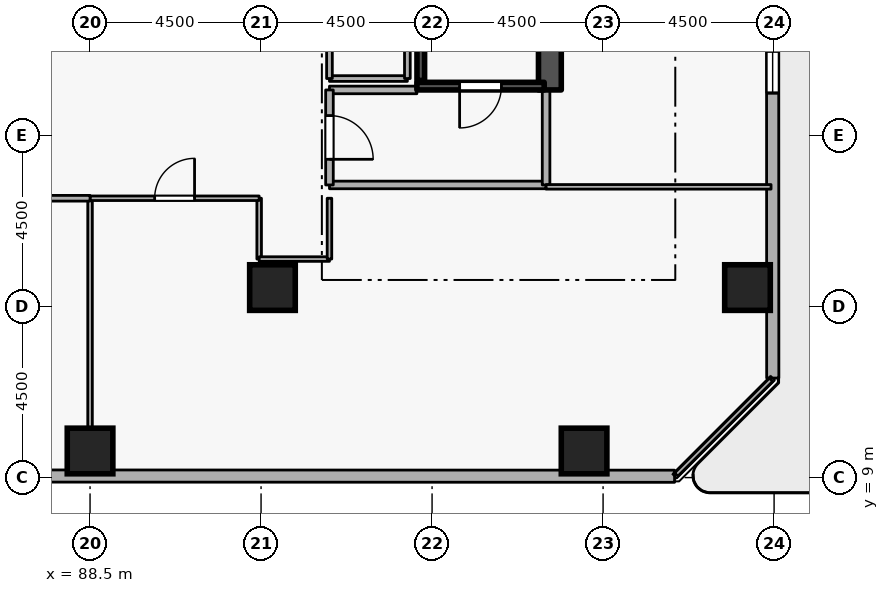
"""IFC4 building model, lengths in metres.
Left out: names, types, materials, properties, quantities, classifications, styles, units other than length and angle.
Written with IfcOpenShell. Run it as: python <this file> out.ifc"""

import sys

from ifc_helpers import new_model, si_unit, direction, frame, frame_2d, origin, origin_2d, place, context, subcontext, project, spatial, rectangle, extrude, element, fill, save


model = new_model("IFC4")
c1 = context("Model", 3, precision=1e-05, world=origin(), true_north=direction((0.0, 1.0)))
c2 = subcontext(c1, "Body", "Model", "MODEL_VIEW")
j1 = project(units=[si_unit("LENGTHUNIT", "METRE"), si_unit("PLANEANGLEUNIT", "RADIAN")], contexts=[c1])
p1 = place(None, origin())
s1 = spatial("IfcSite", under=j1, at=p1, CompositionType="ELEMENT")
p2 = place(p1, origin())
s2 = spatial("IfcBuilding", under=s1, at=p2, CompositionType="ELEMENT")
p3 = place(p2, frame((0.0, 0.0, 75.9)))
s3 = spatial("IfcBuildingStorey", under=s2, at=p3, CompositionType="ELEMENT", Elevation=75.9)
p4 = place(p3, frame((100.6, 19.2, 0.0), z_axis=(0.0, 0.0, 1.0), x_axis=(0.0, 1.0, 0.0)))
e1 = element("IfcWall", 1, at=p4, inside=s3, PredefinedType="SHEAR", context=c2, shape_type="SweptSolid", body=[
    extrude(rectangle(XDim=15.6, YDim=0.6, at=frame_2d((7.8, 0.0))), origin(), (0.0, 0.0, 1.0), 4.2),
])
for number, where, z_axis, x_axis in (
    (2, (105.8, 14.0, 0.0), (0.0, 0.0, 1.0), (1.0, 0.0, 0.0)),
    (3, (101.5, 9.7, 0.0), (0.0, 0.0, 1.0), (1.0, 0.0, 0.0)),
    (4, (88.5, 9.7, 0.0), (0.0, 0.0, 1.0), (1.0, 0.0, 0.0)),
    (5, (93.3, 14.0, 0.0), (0.0, 0.0, 1.0), (1.0, 0.0, 0.0)),
):
    element("IfcColumn", number, at=place(p3, frame(where, z_axis=z_axis, x_axis=x_axis)), inside=s3, PredefinedType="COLUMN", context=c2, shape_type="SweptSolid", body=[
        extrude(rectangle(XDim=1.2, YDim=1.2, at=origin_2d()), origin(), (0.0, 0.0, 1.0), 4.2),
    ])
p5 = place(p3, frame((70.704, 9.047, 0.0), z_axis=(0.0, 0.0, 1.0), x_axis=(0.99999993762, -0.000353213856, 0.0)))
e6 = element("IfcWall", 6, at=p5, inside=s3, PredefinedType="STANDARD", context=c2, shape_type="SweptSolid", body=[
    extrude(rectangle(XDim=33.177, YDim=0.32, at=frame_2d((16.589, 0.0))), origin(), (0.0, 0.0, 1.0), 3.3),
])
p6 = place(p3, frame((106.465, 11.619, 0.0), z_axis=(0.0, 0.0, 1.0), x_axis=(-0.000353213856, 0.99999993762, 0.0)))
e7 = element("IfcWall", 7, at=p6, inside=s3, PredefinedType="STANDARD", context=c2, shape_type="SweptSolid", body=[
    extrude(rectangle(XDim=33.177, YDim=0.32, at=frame_2d((16.589, 0.0))), origin(), (0.0, 0.0, 1.0), 3.3),
])
p7 = place(p6, frame((30.014, 0.0, 0.0)))
e8 = element("IfcOpeningElement", 8, at=p7, cuts=e7, PredefinedType="OPENING", context=c2, shape_type="SweptSolid", body=[
    extrude(rectangle(XDim=1.15, YDim=2.1, at=frame_2d((0.575, 1.05))), frame((0.0, 0.17, 0.0), z_axis=(0.0, -1.0, 0.0), x_axis=(1.0, 0.0, 0.0)), (0.0, 0.0, 1.0), 0.34),
])
p8 = place(p6, frame((7.5, 0.0, 0.72)))
e9 = element("IfcOpeningElement", 9, at=p8, cuts=e7, PredefinedType="OPENING", context=c2, shape_type="SweptSolid", body=[
    extrude(rectangle(XDim=1.1, YDim=1.8, at=frame_2d((0.55, 0.9))), frame((0.0, 0.17, 0.0), z_axis=(0.0, -1.0, 0.0), x_axis=(1.0, 0.0, 0.0)), (0.0, 0.0, 1.0), 0.34),
])
p9 = place(p6, frame((12.3, 0.0, 0.72)))
e10 = element("IfcOpeningElement", 10, at=p9, cuts=e7, PredefinedType="OPENING", context=c2, shape_type="SweptSolid", body=[
    extrude(rectangle(XDim=1.1, YDim=1.8, at=frame_2d((0.55, 0.9))), frame((0.0, 0.17, 0.0), z_axis=(0.0, -1.0, 0.0), x_axis=(1.0, 0.0, 0.0)), (0.0, 0.0, 1.0), 0.34),
])
p10 = place(p6, frame((17.1, 0.0, 0.72)))
e11 = element("IfcOpeningElement", 11, at=p10, cuts=e7, PredefinedType="OPENING", context=c2, shape_type="SweptSolid", body=[
    extrude(rectangle(XDim=1.1, YDim=1.8, at=frame_2d((0.55, 0.9))), frame((0.0, 0.17, 0.0), z_axis=(0.0, -1.0, 0.0), x_axis=(1.0, 0.0, 0.0)), (0.0, 0.0, 1.0), 0.34),
])
p11 = place(p6, frame((21.9, 0.0, 0.72)))
e12 = element("IfcOpeningElement", 12, at=p11, cuts=e7, PredefinedType="OPENING", context=c2, shape_type="SweptSolid", body=[
    extrude(rectangle(XDim=1.1, YDim=1.8, at=frame_2d((0.55, 0.9))), frame((0.0, 0.17, 0.0), z_axis=(0.0, -1.0, 0.0), x_axis=(1.0, 0.0, 0.0)), (0.0, 0.0, 1.0), 0.34),
])
p12 = place(p3, frame((100.45, 19.3, 0.0), z_axis=(0.0, 0.0, 1.0), x_axis=(-1.0, 0.0, 0.0)))
e13 = element("IfcWall", 13, at=p12, inside=s3, PredefinedType="SHEAR", context=c2, shape_type="SweptSolid", body=[
    extrude(rectangle(XDim=3.35, YDim=0.2, at=frame_2d((1.675, 0.0))), origin(), (0.0, 0.0, 1.0), 4.2),
])
p13 = place(p12, frame((1.125, 0.0, 0.0)))
e14 = element("IfcOpeningElement", 14, at=p13, cuts=e13, PredefinedType="OPENING", context=c2, shape_type="SweptSolid", body=[
    extrude(rectangle(XDim=1.1, YDim=2.1, at=frame_2d((0.55, 1.05))), frame((0.0, 0.11, 0.0), z_axis=(0.0, -1.0, 0.0), x_axis=(1.0, 0.0, 0.0)), (0.0, 0.0, 1.0), 0.22),
])
p14 = place(p3, frame((97.203, 26.55, 0.0), z_axis=(0.0, 0.0, 1.0), x_axis=(0.0, -1.0, 0.0)))
e15 = element("IfcWall", 15, at=p14, inside=s3, PredefinedType="SHEAR", context=c2, shape_type="SweptSolid", body=[
    extrude(rectangle(XDim=7.1, YDim=0.2, at=frame_2d((3.55, 0.0))), origin(), (0.0, 0.0, 1.0), 4.2),
])
p15 = place(p3, frame((94.8, 16.7, 0.0), z_axis=(0.0, 0.0, 1.0), x_axis=(1.0, 0.0, 0.0)))
e16 = element("IfcWall", 16, at=p15, inside=s3, PredefinedType="STANDARD", context=c2, shape_type="SweptSolid", body=[
    extrude(rectangle(XDim=5.7, YDim=0.2, at=frame_2d((2.85, 0.0))), origin(), (0.0, 0.0, 1.0), 3.94),
])
p16 = place(p3, frame((100.5, 16.7, 0.0), z_axis=(0.0, 0.0, 1.0), x_axis=(0.0, 1.0, 0.0)))
e17 = element("IfcWall", 17, at=p16, inside=s3, PredefinedType="STANDARD", context=c2, shape_type="SweptSolid", body=[
    extrude(rectangle(XDim=2.5, YDim=0.2, at=frame_2d((1.25, 0.0))), origin(), (0.0, 0.0, 1.0), 3.94),
])
p17 = place(p3, frame((97.1, 19.2, 0.0), z_axis=(0.0, 0.0, 1.0), x_axis=(-1.0, 0.0, 0.0)))
e18 = element("IfcWall", 18, at=p17, inside=s3, PredefinedType="STANDARD", context=c2, shape_type="SweptSolid", body=[
    extrude(rectangle(XDim=2.3, YDim=0.2, at=frame_2d((1.15, 0.0))), origin(), (0.0, 0.0, 1.0), 3.145),
])
p18 = place(p3, frame((94.8, 19.2, 0.0), z_axis=(0.0, 0.0, 1.0), x_axis=(0.0, -1.0, 0.0)))
e19 = element("IfcWall", 19, at=p18, inside=s3, PredefinedType="STANDARD", context=c2, shape_type="SweptSolid", body=[
    extrude(rectangle(XDim=2.5, YDim=0.2, at=frame_2d((1.25, 0.0))), origin(), (0.0, 0.0, 1.0), 3.94),
])
p19 = place(p18, frame((0.675, 0.0, 0.0)))
e20 = element("IfcOpeningElement", 20, at=p19, cuts=e19, PredefinedType="OPENING", context=c2, shape_type="SweptSolid", body=[
    extrude(rectangle(XDim=1.15, YDim=2.1, at=frame_2d((0.575, 1.05))), frame((0.0, 0.11, 0.0), z_axis=(0.0, -1.0, 0.0), x_axis=(1.0, 0.0, 0.0)), (0.0, 0.0, 1.0), 0.22),
])
p20 = place(p3, frame((94.8, 19.5, 0.0), z_axis=(0.0, 0.0, 1.0), x_axis=(1.0, 0.0, 0.0)))
e21 = element("IfcWall", 21, at=p20, inside=s3, PredefinedType="PARTITIONING", context=c2, shape_type="SweptSolid", body=[
    extrude(rectangle(XDim=2.05, YDim=0.15, at=frame_2d((1.025, 0.0))), origin(), (0.0, 0.0, 1.0), 3.145),
])
p21 = place(p3, frame((96.85, 19.5, 0.0), z_axis=(0.0, 0.0, 1.0), x_axis=(0.0, 1.0, 0.0)))
e22 = element("IfcWall", 22, at=p21, inside=s3, PredefinedType="PARTITIONING", context=c2, shape_type="SweptSolid", body=[
    extrude(rectangle(XDim=2.6, YDim=0.15, at=frame_2d((1.3, 0.0))), origin(), (0.0, 0.0, 1.0), 3.94),
])
p22 = place(p3, frame((94.8, 22.1, 0.0), z_axis=(0.0, 0.0, 1.0), x_axis=(0.0, -1.0, 0.0)))
e23 = element("IfcWall", 23, at=p22, inside=s3, PredefinedType="PARTITIONING", context=c2, shape_type="SweptSolid", body=[
    extrude(rectangle(XDim=2.6, YDim=0.15, at=frame_2d((1.3, 0.0))), origin(), (0.0, 0.0, 1.0), 3.94),
])
p23 = place(p22, frame((0.84, 0.0, 0.0)))
e24 = element("IfcOpeningElement", 24, at=p23, cuts=e23, PredefinedType="OPENING", context=c2, shape_type="SweptSolid", body=[
    extrude(rectangle(XDim=0.92, YDim=2.08, at=frame_2d((0.46, 1.04))), frame((0.0, 0.085, 0.0), z_axis=(0.0, -1.0, 0.0), x_axis=(1.0, 0.0, 0.0)), (0.0, 0.0, 1.0), 0.17),
])
p24 = place(p3, frame((92.95, 16.35, 0.0), z_axis=(0.0, 0.0, 1.0), x_axis=(0.0, -1.0, 0.0)))
e25 = element("IfcWall", 25, at=p24, inside=s3, PredefinedType="PARTITIONING", context=c2, shape_type="SweptSolid", body=[
    extrude(rectangle(XDim=1.6, YDim=0.12, at=frame_2d((0.8, 0.0))), origin(), (0.0, 0.0, 1.0), 3.94),
])
p25 = place(p3, frame((92.95, 14.75, 0.0), z_axis=(0.0, 0.0, 1.0), x_axis=(1.0, 0.0, 0.0)))
e26 = element("IfcWall", 26, at=p25, inside=s3, PredefinedType="PARTITIONING", context=c2, shape_type="SweptSolid", body=[
    extrude(rectangle(XDim=1.85, YDim=0.12, at=frame_2d((0.925, 0.0))), origin(), (0.0, 0.0, 1.0), 3.94),
])
p26 = place(p3, frame((94.8, 14.75, 0.0), z_axis=(0.0, 0.0, 1.0), x_axis=(0.0, 1.0, 0.0)))
e27 = element("IfcWall", 27, at=p26, inside=s3, PredefinedType="PARTITIONING", context=c2, shape_type="SweptSolid", body=[
    extrude(rectangle(XDim=1.6, YDim=0.12, at=frame_2d((0.8, 0.0))), origin(), (0.0, 0.0, 1.0), 3.94),
])
p27 = place(p3, frame((100.5, 16.65, 0.0), z_axis=(0.0, 0.0, 1.0), x_axis=(1.0, 0.0, 0.0)))
e28 = element("IfcWall", 28, at=p27, inside=s3, PredefinedType="PARTITIONING", context=c2, shape_type="SweptSolid", body=[
    extrude(rectangle(XDim=5.92, YDim=0.12, at=frame_2d((2.96, 0.0))), origin(), (0.0, 0.0, 1.0), 3.94),
])
p28 = place(p3, frame((106.42, 11.575, 0.0), z_axis=(0.0, 0.0, 1.0), x_axis=(-0.707106781187, -0.707106781187, 0.0)))
e29 = element("IfcWall", 29, at=p28, inside=s3, PredefinedType="PARTITIONING", context=c2, shape_type="SweptSolid", body=[
    extrude(rectangle(XDim=3.528, YDim=0.12, at=frame_2d((1.764, 0.0))), origin(), (0.0, 0.0, 1.0), 3.94),
])
p29 = place(p3, frame((88.5, 9.08, 0.0), z_axis=(0.0, 0.0, 1.0), x_axis=(0.0, 1.0, 0.0)))
e30 = element("IfcWall", 30, at=p29, inside=s3, PredefinedType="PARTITIONING", context=c2, shape_type="SweptSolid", body=[
    extrude(rectangle(XDim=7.27, YDim=0.12, at=frame_2d((3.635, 0.0))), origin(), (0.0, 0.0, 1.0), 3.482),
])
p30 = place(p3, frame((88.5, 16.35, 0.0), z_axis=(0.0, 0.0, 1.0), x_axis=(1.0, 0.0, 0.0)))
e31 = element("IfcWall", 31, at=p30, inside=s3, PredefinedType="PARTITIONING", context=c2, shape_type="SweptSolid", body=[
    extrude(rectangle(XDim=4.45, YDim=0.12, at=frame_2d((2.225, 0.0))), origin(), (0.0, 0.0, 1.0), 3.94),
])
p31 = place(p30, frame((1.7, 0.0, 0.0)))
e32 = element("IfcOpeningElement", 32, at=p31, cuts=e31, PredefinedType="OPENING", context=c2, shape_type="SweptSolid", body=[
    extrude(rectangle(XDim=1.05, YDim=2.1, at=frame_2d((0.525, 1.05))), frame((0.0, 0.07, 0.0), z_axis=(0.0, -1.0, 0.0), x_axis=(1.0, 0.0, 0.0)), (0.0, 0.0, 1.0), 0.14),
])
p32 = place(p3, frame((84.05, 16.35, 0.0), z_axis=(0.0, 0.0, 1.0), x_axis=(1.0, 0.0, 0.0)))
e33 = element("IfcWall", 33, at=p32, inside=s3, PredefinedType="PARTITIONING", context=c2, shape_type="SweptSolid", body=[
    extrude(rectangle(XDim=4.45, YDim=0.15, at=frame_2d((2.225, 0.0))), origin(), (0.0, 0.0, 1.0), 3.94),
])
p33 = place(p32, frame((1.575, 0.0, 0.0)))
e34 = element("IfcOpeningElement", 34, at=p33, cuts=e33, PredefinedType="OPENING", context=c2, shape_type="SweptSolid", body=[
    extrude(rectangle(XDim=1.3, YDim=2.12, at=frame_2d((0.65, 1.06))), frame((0.0, 0.085, 0.0), z_axis=(0.0, -1.0, 0.0), x_axis=(1.0, 0.0, 0.0)), (0.0, 0.0, 1.0), 0.17),
])
p34 = place(p8, origin())
e35 = element("IfcWindow", 35, at=p34, inside=s3, PartitioningType="SINGLE_PANEL", PredefinedType="WINDOW", context=c2, shape_type="SweptSolid", body=[
    extrude(rectangle(XDim=1.1, YDim=1.8, at=frame_2d((0.55, 0.9))), frame((0.0, 0.03, 0.0), z_axis=(0.0, -1.0, 0.0), x_axis=(1.0, 0.0, 0.0)), (0.0, 0.0, 1.0), 0.06),
])
fill(e9, e35)
p35 = place(p13, origin())
e36 = element("IfcDoor", 36, at=p35, inside=s3, OperationType="SINGLE_SWING_RIGHT", PredefinedType="DOOR", context=c2, shape_type="SweptSolid", body=[
    extrude(rectangle(XDim=1.1, YDim=2.1, at=frame_2d((0.55, 1.05))), frame((0.0, 0.025, 0.0), z_axis=(0.0, -1.0, 0.0), x_axis=(1.0, 0.0, 0.0)), (0.0, 0.0, 1.0), 0.05),
])
fill(e14, e36)
p36 = place(p19, origin())
e37 = element("IfcDoor", 37, at=p36, inside=s3, OperationType="SINGLE_SWING_RIGHT", PredefinedType="DOOR", context=c2, shape_type="SweptSolid", body=[
    extrude(rectangle(XDim=1.15, YDim=2.1, at=frame_2d((0.575, 1.05))), frame((0.0, 0.025, 0.0), z_axis=(0.0, -1.0, 0.0), x_axis=(1.0, 0.0, 0.0)), (0.0, 0.0, 1.0), 0.05),
])
fill(e20, e37)
p37 = place(p31, origin())
e38 = element("IfcDoor", 38, at=p37, inside=s3, OperationType="SINGLE_SWING_RIGHT", PredefinedType="DOOR", context=c2, shape_type="SweptSolid", body=[
    extrude(rectangle(XDim=1.05, YDim=2.1, at=frame_2d((0.525, 1.05))), frame((0.0, 0.025, 0.0), z_axis=(0.0, -1.0, 0.0), x_axis=(1.0, 0.0, 0.0)), (0.0, 0.0, 1.0), 0.05),
])
fill(e32, e38)
save(model, sys.argv[1])
